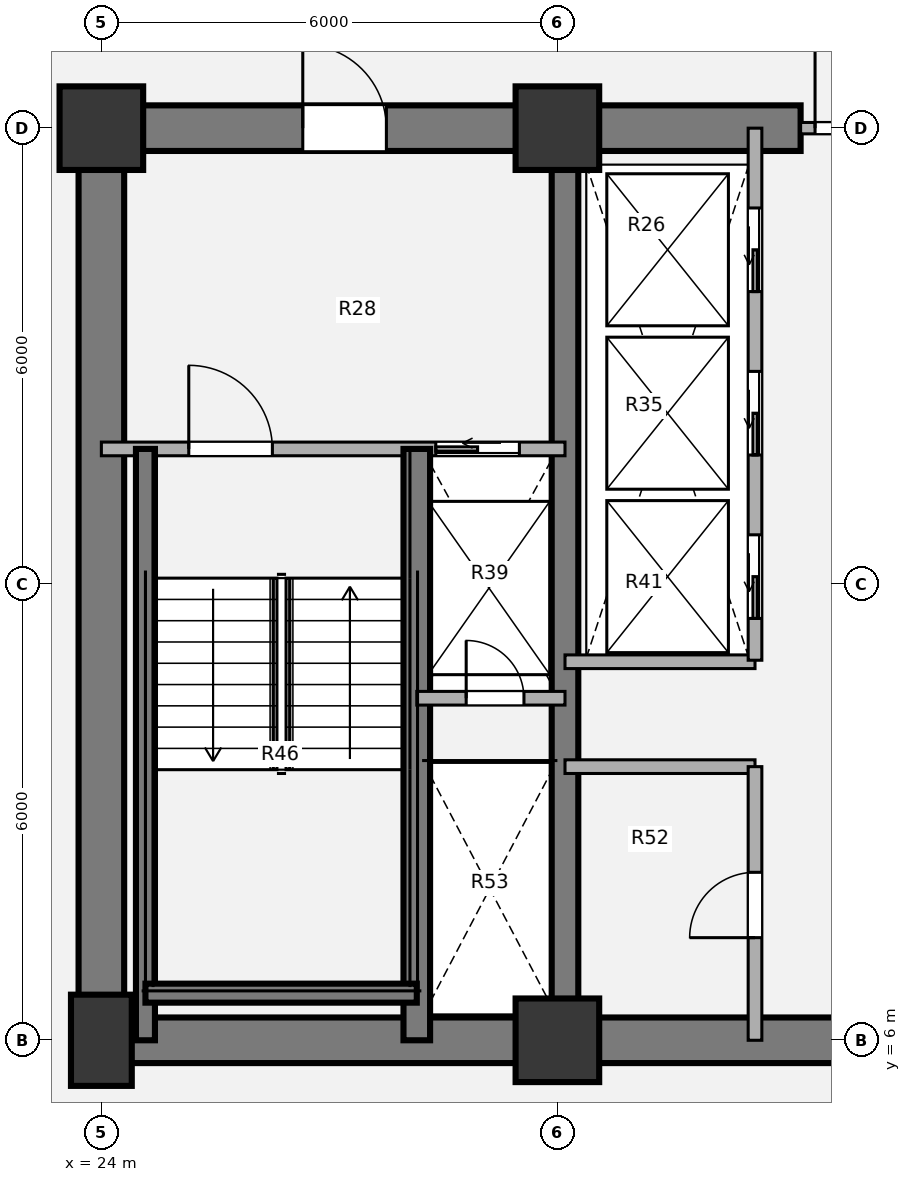
"""IFC4 building model, lengths in metres.
Left out: names, types, materials, properties, quantities, classifications, styles, units other than length and angle.
Written with IfcOpenShell. Run it as: python <this file> out.ifc"""

import sys

from ifc_helpers import new_model, si_unit, direction, frame, frame_2d, origin, origin_2d, place, context, subcontext, project, spatial, rectangle, extrude, source, transform, mapped, element, fill, save


model = new_model("IFC4")
c1 = context("Model", 3, precision=1e-05, world=origin(), true_north=direction((0.0, 1.0)))
c2 = subcontext(c1, "Body", "Model", "MODEL_VIEW")
j1 = project(units=[si_unit("LENGTHUNIT", "METRE"), si_unit("PLANEANGLEUNIT", "RADIAN")], contexts=[c1])
p1 = place(None, origin())
s1 = spatial("IfcSite", under=j1, at=p1, CompositionType="ELEMENT")
p2 = place(p1, origin())
s2 = spatial("IfcBuilding", under=s1, at=p2, CompositionType="ELEMENT")
p3 = place(p2, frame((0.0, 0.0, 34.56)))
s3 = spatial("IfcBuildingStorey", under=s2, at=p3, CompositionType="ELEMENT", Elevation=34.56)
m1 = source(origin(), c2, "Body", "SweptSolid", [
    extrude(rectangle(XDim=0.8, YDim=1.2, at=origin_2d()), origin(), (0.0, 0.0, 1.0), 3.78),
])
p4 = place(p3, frame((24.0, 6.0, 0.0), z_axis=(0.0, 0.0, 1.0), x_axis=(1.0, 0.0, 0.0)))
e1 = element("IfcColumn", 1, at=p4, inside=s3, PredefinedType="COLUMN", context=c2, shape_type="MappedRepresentation", body=[
    mapped(m1, transform((0.0, 0.0, 0.0), x_axis=(1.0, 0.0, 0.0), y_axis=(0.0, 1.0, 0.0), z_axis=(0.0, 0.0, 1.0), scale=1.0)),
])
m2 = source(origin(), c2, "Body", "SweptSolid", [
    extrude(rectangle(XDim=1.1, YDim=1.1, at=origin_2d()), origin(), (0.0, 0.0, 1.0), 3.78),
])
for number, where, z_axis, x_axis in (
    (2, (30.0, 6.0, 0.0), (0.0, 0.0, 1.0), (1.0, 0.0, 0.0)),
    (3, (24.0, 18.0, 0.0), (0.0, 0.0, 1.0), (1.0, 0.0, 0.0)),
    (4, (30.0, 18.0, 0.0), (0.0, 0.0, 1.0), (1.0, 0.0, 0.0)),
):
    element("IfcColumn", number, at=place(p3, frame(where, z_axis=z_axis, x_axis=x_axis)), inside=s3, PredefinedType="COLUMN", context=c2, shape_type="MappedRepresentation", body=[
        mapped(m2, transform((0.0, 0.0, 0.0), x_axis=(1.0, 0.0, 0.0), y_axis=(0.0, 1.0, 0.0), z_axis=(0.0, 0.0, 1.0), scale=1.0)),
    ])
p5 = place(p3, frame((48.3, 6.0, 0.0), z_axis=(0.0, 0.0, 1.0), x_axis=(-1.0, 0.0, 0.0)))
e5 = element("IfcWall", 5, at=p5, inside=s3, PredefinedType="SHEAR", context=c2, shape_type="SweptSolid", body=[
    extrude(rectangle(XDim=24.6, YDim=0.6, at=frame_2d((12.3, 0.0))), origin(), (0.0, 0.0, 1.0), 3.78),
])
p6 = place(p3, frame((24.0, 6.0, 0.0), z_axis=(0.0, 0.0, 1.0), x_axis=(0.0, 1.0, 0.0)))
e6 = element("IfcWall", 6, at=p6, inside=s3, PredefinedType="SHEAR", context=c2, shape_type="SweptSolid", body=[
    extrude(rectangle(XDim=12.0, YDim=0.6, at=frame_2d((6.0, 0.0))), origin(), (0.0, 0.0, 1.0), 3.78),
])
p7 = place(p3, frame((23.7, 18.0, 0.0), z_axis=(0.0, 0.0, 1.0), x_axis=(1.0, 0.0, 0.0)))
e7 = element("IfcWall", 7, at=p7, inside=s3, PredefinedType="SHEAR", context=c2, shape_type="SweptSolid", body=[
    extrude(rectangle(XDim=9.5, YDim=0.6, at=frame_2d((4.75, 0.0))), origin(), (0.0, 0.0, 1.0), 3.78),
])
p8 = place(p7, frame((2.95, 0.0, 0.0)))
e8 = element("IfcOpeningElement", 8, at=p8, cuts=e7, PredefinedType="OPENING", context=c2, shape_type="SweptSolid", body=[
    extrude(rectangle(XDim=1.1, YDim=2.1, at=origin_2d()), frame((0.55, 0.31, 1.05), z_axis=(0.0, -1.0, 0.0), x_axis=(1.0, 0.0, 0.0)), (0.0, 0.0, 1.0), 0.62),
])
p9 = place(p3, frame((30.1, 6.0, 0.0), z_axis=(0.0, 0.0, 1.0), x_axis=(0.0, 1.0, 0.0)))
e9 = element("IfcWall", 9, at=p9, inside=s3, PredefinedType="SHEAR", context=c2, shape_type="SweptSolid", body=[
    extrude(rectangle(XDim=12.0, YDim=0.35, at=frame_2d((6.0, 0.0))), origin(), (0.0, 0.0, 1.0), 3.78),
])
for number, where, z_axis, x_axis in (
    (10, (30.1, 10.98, 0.0), (0.0, 0.0, 1.0), (1.0, 0.0, 0.0)),
    (11, (30.1, 9.6, 0.0), (0.0, 0.0, 1.0), (1.0, 0.0, 0.0)),
):
    element("IfcWall", number, at=place(p3, frame(where, z_axis=z_axis, x_axis=x_axis)), inside=s3, PredefinedType="PARTITIONING", context=c2, shape_type="SweptSolid", body=[
        extrude(rectangle(XDim=2.5, YDim=0.18, at=frame_2d((1.25, 0.0))), origin(), (0.0, 0.0, 1.0), 3.5),
    ])
p10 = place(p3, frame((32.6, 6.0, 0.0), z_axis=(0.0, 0.0, 1.0), x_axis=(0.0, 1.0, 0.0)))
e12 = element("IfcWall", 12, at=p10, inside=s3, PredefinedType="PARTITIONING", context=c2, shape_type="SweptSolid", body=[
    extrude(rectangle(XDim=3.6, YDim=0.18, at=frame_2d((1.8, 0.0))), origin(), (0.0, 0.0, 1.0), 3.5),
])
p11 = place(p10, frame((1.35, 0.0, 0.0)))
e13 = element("IfcOpeningElement", 13, at=p11, cuts=e12, PredefinedType="OPENING", context=c2, shape_type="SweptSolid", body=[
    extrude(rectangle(XDim=0.86, YDim=2.1, at=origin_2d()), frame((0.43, 0.1, 1.05), z_axis=(0.0, -1.0, 0.0), x_axis=(1.0, 0.0, 0.0)), (0.0, 0.0, 1.0), 0.2),
])
p12 = place(p3, frame((33.2, 18.0, 0.0), z_axis=(0.0, 0.0, 1.0), x_axis=(1.0, 0.0, 0.0)))
e14 = element("IfcWall", 14, at=p12, inside=s3, PredefinedType="PARTITIONING", context=c2, shape_type="SweptSolid", body=[
    extrude(rectangle(XDim=5.6, YDim=0.15, at=frame_2d((2.8, 0.0))), origin(), (0.0, 0.0, 1.0), 2.315),
])
p13 = place(p12, frame((0.19, 0.0, 0.0)))
e15 = element("IfcOpeningElement", 15, at=p13, cuts=e14, PredefinedType="OPENING", context=c2, shape_type="SweptSolid", body=[
    extrude(rectangle(XDim=1.1, YDim=2.1, at=origin_2d()), frame((0.55, 0.085, 1.05), z_axis=(0.0, -1.0, 0.0), x_axis=(1.0, 0.0, 0.0)), (0.0, 0.0, 1.0), 0.17),
])
p14 = place(p12, frame((4.31, 0.0, 0.0)))
e16 = element("IfcOpeningElement", 16, at=p14, cuts=e14, PredefinedType="OPENING", context=c2, shape_type="SweptSolid", body=[
    extrude(rectangle(XDim=1.1, YDim=2.1, at=origin_2d()), frame((0.55, 0.085, 1.05), z_axis=(0.0, -1.0, 0.0), x_axis=(1.0, 0.0, 0.0)), (0.0, 0.0, 1.0), 0.17),
])
p15 = place(p3, frame((24.0, 13.78, 0.0), z_axis=(0.0, 0.0, 1.0), x_axis=(1.0, 0.0, 0.0)))
e17 = element("IfcWall", 17, at=p15, inside=s3, PredefinedType="PARTITIONING", context=c2, shape_type="SweptSolid", body=[
    extrude(rectangle(XDim=6.1, YDim=0.18, at=frame_2d((3.05, 0.0))), origin(), (0.0, 0.0, 1.0), 3.5),
])
p16 = place(p15, frame((1.15, 0.0, 0.0)))
e18 = element("IfcOpeningElement", 18, at=p16, cuts=e17, PredefinedType="OPENING", context=c2, shape_type="SweptSolid", body=[
    extrude(rectangle(XDim=1.1, YDim=2.1, at=origin_2d()), frame((0.55, 0.1, 1.05), z_axis=(0.0, -1.0, 0.0), x_axis=(1.0, 0.0, 0.0)), (0.0, 0.0, 1.0), 0.2),
])
p17 = place(p15, frame((4.4, 0.0, 0.0)))
e19 = element("IfcOpeningElement", 19, at=p17, cuts=e17, PredefinedType="OPENING", context=c2, shape_type="SweptSolid", body=[
    extrude(rectangle(XDim=1.1, YDim=2.1, at=origin_2d()), frame((0.55, 0.1, 1.05), z_axis=(0.0, -1.0, 0.0), x_axis=(1.0, 0.0, 0.0)), (0.0, 0.0, 1.0), 0.2),
])
p18 = place(p3, frame((28.15, 6.0, 0.0), z_axis=(0.0, 0.0, 1.0), x_axis=(0.0, 1.0, 0.0)))
e20 = element("IfcWall", 20, at=p18, inside=s3, PredefinedType="SHEAR", context=c2, shape_type="SweptSolid", body=[
    extrude(rectangle(XDim=7.78, YDim=0.35, at=frame_2d((3.89, 0.0))), origin(), (0.0, 0.0, 1.0), 3.85),
])
p19 = place(p3, frame((24.58, 6.0, 0.0), z_axis=(0.0, 0.0, 1.0), x_axis=(0.0, 1.0, 0.0)))
e21 = element("IfcWall", 21, at=p19, inside=s3, PredefinedType="SHEAR", context=c2, shape_type="SweptSolid", body=[
    extrude(rectangle(XDim=7.78, YDim=0.25, at=frame_2d((3.89, 0.0))), origin(), (0.0, 0.0, 1.0), 3.85),
])
p20 = place(p3, frame((24.58, 6.62, 0.0), z_axis=(0.0, 0.0, 1.0), x_axis=(1.0, 0.0, 0.0)))
e22 = element("IfcWall", 22, at=p20, inside=s3, PredefinedType="SHEAR", context=c2, shape_type="SweptSolid", body=[
    extrude(rectangle(XDim=3.57, YDim=0.25, at=frame_2d((1.785, 0.0))), origin(), (0.0, 0.0, 1.0), 3.85),
])
p21 = place(p3, frame((28.15, 10.5, 0.0), z_axis=(0.0, 0.0, 1.0), x_axis=(1.0, 0.0, 0.0)))
e23 = element("IfcWall", 23, at=p21, inside=s3, PredefinedType="PARTITIONING", context=c2, shape_type="SweptSolid", body=[
    extrude(rectangle(XDim=1.95, YDim=0.18, at=frame_2d((0.975, 0.0))), origin(), (0.0, 0.0, 1.0), 3.5),
])
p22 = place(p21, frame((0.65, 0.0, 0.0)))
e24 = element("IfcOpeningElement", 24, at=p22, cuts=e23, PredefinedType="OPENING", context=c2, shape_type="SweptSolid", body=[
    extrude(rectangle(XDim=0.76, YDim=2.05, at=origin_2d()), frame((0.38, 0.1, 1.025), z_axis=(0.0, -1.0, 0.0), x_axis=(1.0, 0.0, 0.0)), (0.0, 0.0, 1.0), 0.2),
])
p23 = place(p3, frame((32.6, 11.0, 0.0), z_axis=(0.0, 0.0, 1.0), x_axis=(0.0, 1.0, 0.0)))
e25 = element("IfcWall", 25, at=p23, inside=s3, PredefinedType="PARTITIONING", context=c2, shape_type="SweptSolid", body=[
    extrude(rectangle(XDim=7.0, YDim=0.18, at=frame_2d((3.5, 0.0))), origin(), (0.0, 0.0, 1.0), 3.5),
])
p24 = place(p23, frame((0.55, 0.0, 0.0)))
e26 = element("IfcOpeningElement", 26, at=p24, cuts=e25, PredefinedType="OPENING", context=c2, shape_type="SweptSolid", body=[
    extrude(rectangle(XDim=1.1, YDim=2.1, at=origin_2d()), frame((0.55, 0.1, 1.05), z_axis=(0.0, -1.0, 0.0), x_axis=(1.0, 0.0, 0.0)), (0.0, 0.0, 1.0), 0.2),
])
p25 = place(p23, frame((2.7, 0.0, 0.0)))
e27 = element("IfcOpeningElement", 27, at=p25, cuts=e25, PredefinedType="OPENING", context=c2, shape_type="SweptSolid", body=[
    extrude(rectangle(XDim=1.1, YDim=2.1, at=origin_2d()), frame((0.55, 0.1, 1.05), z_axis=(0.0, -1.0, 0.0), x_axis=(1.0, 0.0, 0.0)), (0.0, 0.0, 1.0), 0.2),
])
p26 = place(p23, frame((4.85, 0.0, 0.0)))
e28 = element("IfcOpeningElement", 28, at=p26, cuts=e25, PredefinedType="OPENING", context=c2, shape_type="SweptSolid", body=[
    extrude(rectangle(XDim=1.1, YDim=2.1, at=origin_2d()), frame((0.55, 0.1, 1.05), z_axis=(0.0, -1.0, 0.0), x_axis=(1.0, 0.0, 0.0)), (0.0, 0.0, 1.0), 0.2),
])
m3 = source(origin(), c2, "Body", "SweptSolid", [
    extrude(rectangle(XDim=0.86, YDim=2.1, at=origin_2d()), frame((0.43, 0.025, 1.05), z_axis=(0.0, -1.0, 0.0), x_axis=(1.0, 0.0, 0.0)), (0.0, 0.0, 1.0), 0.05),
])
p27 = place(p11, origin())
e29 = element("IfcDoor", 29, at=p27, inside=s3, OperationType="SINGLE_SWING_LEFT", PredefinedType="DOOR", context=c2, shape_type="MappedRepresentation", body=[
    mapped(m3, transform((0.0, 0.0, 0.0), x_axis=(1.0, 0.0, 0.0), y_axis=(0.0, 1.0, 0.0), z_axis=(0.0, 0.0, 1.0), scale=1.0)),
])
fill(e13, e29)
m4 = source(origin(), c2, "Body", "SweptSolid", [
    extrude(rectangle(XDim=1.1, YDim=2.1, at=origin_2d()), frame((0.55, 0.025, 1.05), z_axis=(0.0, -1.0, 0.0), x_axis=(1.0, 0.0, 0.0)), (0.0, 0.0, 1.0), 0.05),
])
p28 = place(p13, origin())
e30 = element("IfcDoor", 30, at=p28, inside=s3, OperationType="SINGLE_SWING_LEFT", PredefinedType="DOOR", context=c2, shape_type="MappedRepresentation", body=[
    mapped(m4, transform((0.0, 0.0, 0.0), x_axis=(1.0, 0.0, 0.0), y_axis=(0.0, 1.0, 0.0), z_axis=(0.0, 0.0, 1.0), scale=1.0)),
])
fill(e15, e30)
m5 = source(origin(), c2, "Body", "SweptSolid", [
    extrude(rectangle(XDim=1.1, YDim=2.1, at=origin_2d()), frame((0.55, 0.025, 1.05), z_axis=(0.0, -1.0, 0.0), x_axis=(1.0, 0.0, 0.0)), (0.0, 0.0, 1.0), 0.05),
])
p29 = place(p16, origin())
e31 = element("IfcDoor", 31, at=p29, inside=s3, OperationType="SINGLE_SWING_LEFT", PredefinedType="DOOR", context=c2, shape_type="MappedRepresentation", body=[
    mapped(m5, transform((0.0, 0.0, 0.0), x_axis=(1.0, 0.0, 0.0), y_axis=(0.0, 1.0, 0.0), z_axis=(0.0, 0.0, 1.0), scale=1.0)),
])
fill(e18, e31)
m6 = source(origin(), c2, "Body", "SweptSolid", [
    extrude(rectangle(XDim=1.1, YDim=2.1, at=origin_2d()), frame((0.55, 0.025, 1.05), z_axis=(0.0, -1.0, 0.0), x_axis=(1.0, 0.0, 0.0)), (0.0, 0.0, 1.0), 0.05),
])
p30 = place(p17, origin())
e32 = element("IfcDoor", 32, at=p30, inside=s3, OperationType="SLIDING_TO_LEFT", PredefinedType="DOOR", context=c2, shape_type="MappedRepresentation", body=[
    mapped(m6, transform((0.0, 0.0, 0.0), x_axis=(1.0, 0.0, 0.0), y_axis=(0.0, 1.0, 0.0), z_axis=(0.0, 0.0, 1.0), scale=1.0)),
])
fill(e19, e32)
m7 = source(origin(), c2, "Body", "SweptSolid", [
    extrude(rectangle(XDim=0.76, YDim=2.05, at=origin_2d()), frame((0.38, 0.025, 1.025), z_axis=(0.0, -1.0, 0.0), x_axis=(1.0, 0.0, 0.0)), (0.0, 0.0, 1.0), 0.05),
])
p31 = place(p22, origin())
e33 = element("IfcDoor", 33, at=p31, inside=s3, OperationType="SINGLE_SWING_LEFT", PredefinedType="DOOR", context=c2, shape_type="MappedRepresentation", body=[
    mapped(m7, transform((0.0, 0.0, 0.0), x_axis=(1.0, 0.0, 0.0), y_axis=(0.0, 1.0, 0.0), z_axis=(0.0, 0.0, 1.0), scale=1.0)),
])
fill(e24, e33)
p32 = place(p8, origin())
e34 = element("IfcDoor", 34, at=p32, inside=s3, OperationType="SINGLE_SWING_LEFT", PredefinedType="DOOR", context=c2, shape_type="MappedRepresentation", body=[
    mapped(m4, transform((0.0, 0.0, 0.0), x_axis=(1.0, 0.0, 0.0), y_axis=(0.0, 1.0, 0.0), z_axis=(0.0, 0.0, 1.0), scale=1.0)),
])
fill(e8, e34)
p33 = place(p24, origin())
e35 = element("IfcDoor", 35, at=p33, inside=s3, OperationType="SLIDING_TO_LEFT", PredefinedType="DOOR", context=c2, shape_type="MappedRepresentation", body=[
    mapped(m6, transform((0.0, 0.0, 0.0), x_axis=(1.0, 0.0, 0.0), y_axis=(0.0, 1.0, 0.0), z_axis=(0.0, 0.0, 1.0), scale=1.0)),
])
fill(e26, e35)
p34 = place(p25, origin())
e36 = element("IfcDoor", 36, at=p34, inside=s3, OperationType="SLIDING_TO_LEFT", PredefinedType="DOOR", context=c2, shape_type="MappedRepresentation", body=[
    mapped(m6, transform((0.0, 0.0, 0.0), x_axis=(1.0, 0.0, 0.0), y_axis=(0.0, 1.0, 0.0), z_axis=(0.0, 0.0, 1.0), scale=1.0)),
])
fill(e27, e36)
p35 = place(p26, origin())
e37 = element("IfcDoor", 37, at=p35, inside=s3, OperationType="SLIDING_TO_LEFT", PredefinedType="DOOR", context=c2, shape_type="MappedRepresentation", body=[
    mapped(m6, transform((0.0, 0.0, 0.0), x_axis=(1.0, 0.0, 0.0), y_axis=(0.0, 1.0, 0.0), z_axis=(0.0, 0.0, 1.0), scale=1.0)),
])
fill(e28, e37)
save(model, sys.argv[1])
